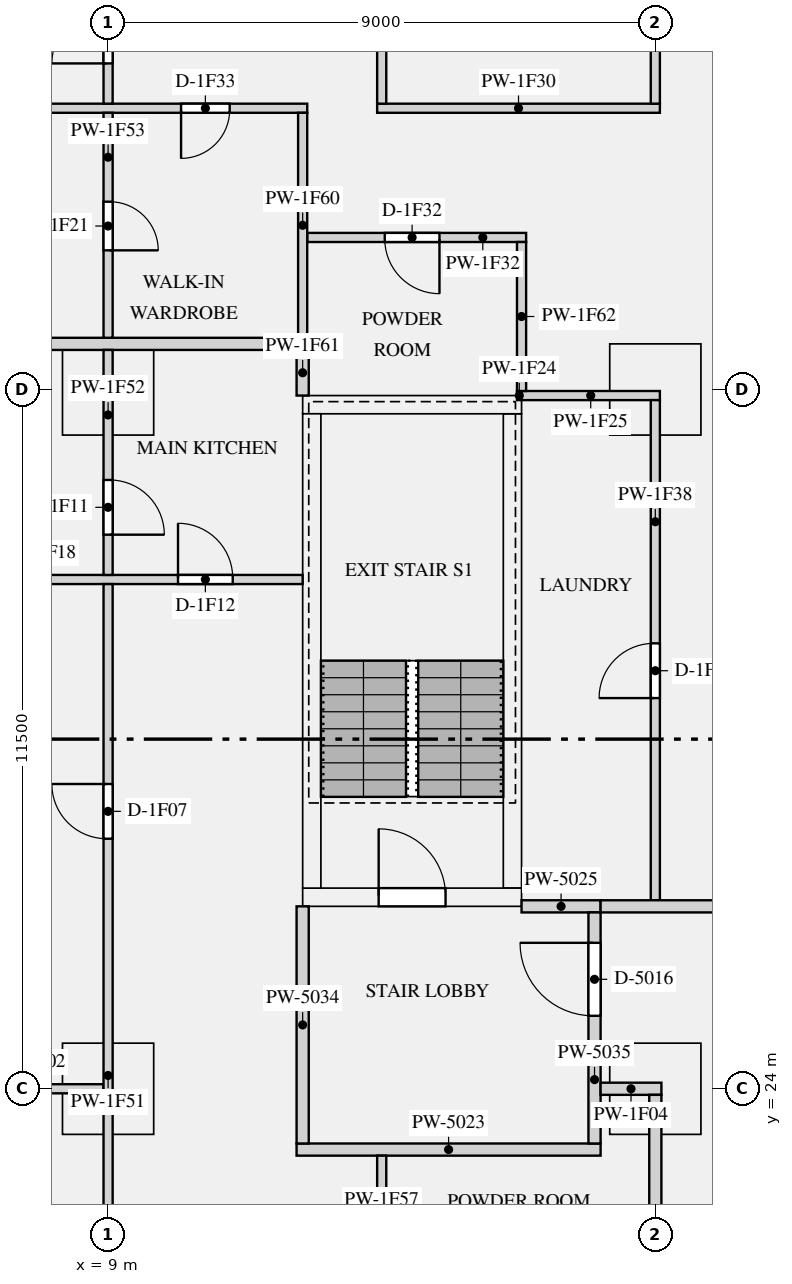
"""IFC4 building model, lengths in metres.
Left out: names, types, materials, properties, quantities, classifications, styles, units other than length and angle.
Written with IfcOpenShell. Run it as: python <this file> out.ifc"""

import sys

from ifc_helpers import new_model, si_unit, direction, frame, frame_2d, origin, origin_2d, place, context, subcontext, project, spatial, rectangle, extrude, element, fill, save


model = new_model("IFC4")
c1 = context("Model", 3, precision=1e-05, world=origin(), true_north=direction((0.0, 1.0)))
c2 = subcontext(c1, "Body", "Model", "MODEL_VIEW")
j1 = project(units=[si_unit("LENGTHUNIT", "METRE"), si_unit("PLANEANGLEUNIT", "RADIAN")], contexts=[c1])
p1 = place(None, origin())
s1 = spatial("IfcSite", under=j1, at=p1, CompositionType="ELEMENT")
p2 = place(p1, origin())
s2 = spatial("IfcBuilding", under=s1, at=p2, CompositionType="ELEMENT")
p3 = place(p2, frame((0.0, 0.0, 60.45)))
s3 = spatial("IfcBuildingStorey", under=s2, at=p3, CompositionType="ELEMENT", Elevation=60.45)
for number, where, z_axis, x_axis in (
    (1, (9.0, 24.0, 0.0), (0.0, 0.0, 1.0), (1.0, 0.0, 0.0)),
    (2, (18.0, 24.0, 0.0), (0.0, 0.0, 1.0), (1.0, 0.0, 0.0)),
    (3, (9.0, 35.5, 0.0), (0.0, 0.0, 1.0), (1.0, 0.0, 0.0)),
    (4, (18.0, 35.5, 0.0), (0.0, 0.0, 1.0), (1.0, 0.0, 0.0)),
):
    element("IfcColumn", number, at=place(p3, frame(where, z_axis=z_axis, x_axis=x_axis)), inside=s3, PredefinedType="COLUMN", context=c2, shape_type="SweptSolid", body=[
        extrude(rectangle(XDim=1.5, YDim=1.5, at=origin_2d()), origin(), (0.0, 0.0, 1.0), 3.15),
    ])
p4 = place(p3, frame((12.2, 27.15, 0.0), z_axis=(0.0, 0.0, 1.0), x_axis=(1.0, 0.0, 0.0)))
e5 = element("IfcWall", 5, at=p4, inside=s3, PredefinedType="SHEAR", context=c2, shape_type="SweptSolid", body=[
    extrude(rectangle(XDim=3.6, YDim=0.3, at=frame_2d((1.8, 0.0))), origin(), (0.0, 0.0, 1.0), 3.15),
])
p5 = place(p4, frame((1.25, 0.0, 0.0)))
e6 = element("IfcOpeningElement", 6, at=p5, cuts=e5, PredefinedType="OPENING", context=c2, shape_type="SweptSolid", body=[
    extrude(rectangle(XDim=1.1, YDim=2.1, at=frame_2d((0.55, 1.05))), frame((0.0, 0.16, 0.0), z_axis=(0.0, -1.0, 0.0), x_axis=(1.0, 0.0, 0.0)), (0.0, 0.0, 1.0), 0.32),
])
p6 = place(p3, frame((12.2, 35.25, 0.0), z_axis=(0.0, 0.0, 1.0), x_axis=(1.0, 0.0, 0.0)))
e7 = element("IfcWall", 7, at=p6, inside=s3, PredefinedType="SHEAR", context=c2, shape_type="SweptSolid", body=[
    extrude(rectangle(XDim=3.6, YDim=0.3, at=frame_2d((1.8, 0.0))), origin(), (0.0, 0.0, 1.0), 3.15),
])
for number, where, z_axis, x_axis in (
    (8, (12.35, 27.3, 0.0), (0.0, 0.0, 1.0), (0.0, 1.0, 0.0)),
    (9, (15.65, 27.3, 0.0), (0.0, 0.0, 1.0), (0.0, 1.0, 0.0)),
):
    element("IfcWall", number, at=place(p3, frame(where, z_axis=z_axis, x_axis=x_axis)), inside=s3, PredefinedType="SHEAR", context=c2, shape_type="SweptSolid", body=[
        extrude(rectangle(XDim=7.8, YDim=0.3, at=frame_2d((3.9, 0.0))), origin(), (0.0, 0.0, 1.0), 3.15),
    ])
p7 = place(p3, frame((12.1, 23.0, 0.0), z_axis=(0.0, 0.0, 1.0), x_axis=(1.0, 0.0, 0.0)))
e10 = element("IfcWall", 10, at=p7, inside=s3, PredefinedType="PARTITIONING", context=c2, shape_type="SweptSolid", body=[
    extrude(rectangle(XDim=5.0, YDim=0.2, at=frame_2d((2.5, 0.0))), origin(), (0.0, 0.0, 1.0), 2.83),
])
p8 = place(p3, frame((15.8, 27.0, 0.0), z_axis=(0.0, 0.0, 1.0), x_axis=(1.0, 0.0, 0.0)))
e11 = element("IfcWall", 11, at=p8, inside=s3, PredefinedType="PARTITIONING", context=c2, shape_type="SweptSolid", body=[
    extrude(rectangle(XDim=1.3, YDim=0.2, at=frame_2d((0.65, 0.0))), origin(), (0.0, 0.0, 1.0), 2.83),
])
p9 = place(p3, frame((12.2, 23.1, 0.0), z_axis=(0.0, 0.0, 1.0), x_axis=(0.0, 1.0, 0.0)))
e12 = element("IfcWall", 12, at=p9, inside=s3, PredefinedType="PARTITIONING", context=c2, shape_type="SweptSolid", body=[
    extrude(rectangle(XDim=3.9, YDim=0.2, at=frame_2d((1.95, 0.0))), origin(), (0.0, 0.0, 1.0), 2.83),
])
p10 = place(p3, frame((17.0, 23.1, 0.0), z_axis=(0.0, 0.0, 1.0), x_axis=(0.0, 1.0, 0.0)))
e13 = element("IfcWall", 13, at=p10, inside=s3, PredefinedType="PARTITIONING", context=c2, shape_type="SweptSolid", body=[
    extrude(rectangle(XDim=3.8, YDim=0.2, at=frame_2d((1.9, 0.0))), origin(), (0.0, 0.0, 1.0), 2.83),
])
p11 = place(p10, frame((2.1, 0.0, 0.0)))
e14 = element("IfcOpeningElement", 14, at=p11, cuts=e13, PredefinedType="OPENING", context=c2, shape_type="SweptSolid", body=[
    extrude(rectangle(XDim=1.2, YDim=2.1, at=frame_2d((0.6, 1.05))), frame((0.0, 0.11, 0.0), z_axis=(0.0, -1.0, 0.0), x_axis=(1.0, 0.0, 0.0)), (0.0, 0.0, 1.0), 0.22),
])
p12 = place(p3, frame((3.3, 24.0, 0.0), z_axis=(0.0, 0.0, 1.0), x_axis=(1.0, 0.0, 0.0)))
e15 = element("IfcWall", 15, at=p12, inside=s3, PredefinedType="PARTITIONING", context=c2, shape_type="SweptSolid", body=[
    extrude(rectangle(XDim=5.625, YDim=0.15, at=frame_2d((2.812, 0.0))), origin(), (0.0, 0.0, 1.0), 2.83),
])
p13 = place(p12, frame((1.65, 0.0, 0.0)))
e16 = element("IfcOpeningElement", 16, at=p13, cuts=e15, PredefinedType="OPENING", context=c2, shape_type="SweptSolid", body=[
    extrude(rectangle(XDim=1.5, YDim=2.1, at=frame_2d((0.75, 1.05))), frame((0.0, 0.085, 0.0), z_axis=(0.0, -1.0, 0.0), x_axis=(1.0, 0.0, 0.0)), (0.0, 0.0, 1.0), 0.17),
])
p14 = place(p3, frame((17.1, 24.0, 0.0), z_axis=(0.0, 0.0, 1.0), x_axis=(1.0, 0.0, 0.0)))
e17 = element("IfcWall", 17, at=p14, inside=s3, PredefinedType="PARTITIONING", context=c2, shape_type="SweptSolid", body=[
    extrude(rectangle(XDim=1.0, YDim=0.2, at=frame_2d((0.5, 0.0))), origin(), (0.0, 0.0, 1.0), 2.83),
])
p15 = place(p3, frame((17.1, 27.0, 0.0), z_axis=(0.0, 0.0, 1.0), x_axis=(1.0, 0.0, 0.0)))
e18 = element("IfcWall", 18, at=p15, inside=s3, PredefinedType="PARTITIONING", context=c2, shape_type="SweptSolid", body=[
    extrude(rectangle(XDim=7.0, YDim=0.2, at=frame_2d((3.5, 0.0))), origin(), (0.0, 0.0, 1.0), 2.83),
])
p16 = place(p3, frame((0.8, 32.375, 0.0), z_axis=(0.0, 0.0, 1.0), x_axis=(1.0, 0.0, 0.0)))
e19 = element("IfcWall", 19, at=p16, inside=s3, PredefinedType="PARTITIONING", context=c2, shape_type="SweptSolid", body=[
    extrude(rectangle(XDim=11.4, YDim=0.15, at=frame_2d((5.7, 0.0))), origin(), (0.0, 0.0, 1.0), 2.83),
])
p17 = place(p16, frame((3.275, 0.0, 0.0)))
e20 = element("IfcOpeningElement", 20, at=p17, cuts=e19, PredefinedType="OPENING", context=c2, shape_type="SweptSolid", body=[
    extrude(rectangle(XDim=1.5, YDim=2.1, at=frame_2d((0.75, 1.05))), frame((0.0, 0.085, 0.0), z_axis=(0.0, -1.0, 0.0), x_axis=(1.0, 0.0, 0.0)), (0.0, 0.0, 1.0), 0.17),
])
p18 = place(p16, frame((9.35, 0.0, 0.0)))
e21 = element("IfcOpeningElement", 21, at=p18, cuts=e19, PredefinedType="OPENING", context=c2, shape_type="SweptSolid", body=[
    extrude(rectangle(XDim=0.9, YDim=2.1, at=frame_2d((0.45, 1.05))), frame((0.0, 0.085, 0.0), z_axis=(0.0, -1.0, 0.0), x_axis=(1.0, 0.0, 0.0)), (0.0, 0.0, 1.0), 0.17),
])
p19 = place(p3, frame((0.8, 36.25, 0.0), z_axis=(0.0, 0.0, 1.0), x_axis=(1.0, 0.0, 0.0)))
e22 = element("IfcWall", 22, at=p19, inside=s3, PredefinedType="PARTITIONING", context=c2, shape_type="SweptSolid", body=[
    extrude(rectangle(XDim=11.475, YDim=0.2, at=frame_2d((5.737, 0.0))), origin(), (0.0, 0.0, 1.0), 2.83),
])
p20 = place(p3, frame((15.725, 35.4, 0.0), z_axis=(0.0, 0.0, 1.0), x_axis=(1.0, 0.0, 0.0)))
e23 = element("IfcWall", 23, at=p20, inside=s3, PredefinedType="PARTITIONING", context=c2, shape_type="SweptSolid", body=[
    extrude(rectangle(XDim=0.075, YDim=0.15, at=frame_2d((0.038, 0.0))), origin(), (0.0, 0.0, 1.0), 2.83),
])
p21 = place(p3, frame((15.8, 35.4, 0.0), z_axis=(0.0, 0.0, 1.0), x_axis=(1.0, 0.0, 0.0)))
e24 = element("IfcWall", 24, at=p21, inside=s3, PredefinedType="PARTITIONING", context=c2, shape_type="SweptSolid", body=[
    extrude(rectangle(XDim=2.275, YDim=0.15, at=frame_2d((1.137, 0.0))), origin(), (0.0, 0.0, 1.0), 2.83),
])
p22 = place(p3, frame((0.8, 40.125, 0.0), z_axis=(0.0, 0.0, 1.0), x_axis=(1.0, 0.0, 0.0)))
e25 = element("IfcWall", 25, at=p22, inside=s3, PredefinedType="PARTITIONING", context=c2, shape_type="SweptSolid", body=[
    extrude(rectangle(XDim=11.475, YDim=0.15, at=frame_2d((5.737, 0.0))), origin(), (0.0, 0.0, 1.0), 2.83),
])
p23 = place(p22, frame((9.4, 0.0, 0.0)))
e26 = element("IfcOpeningElement", 26, at=p23, cuts=e25, PredefinedType="OPENING", context=c2, shape_type="SweptSolid", body=[
    extrude(rectangle(XDim=0.8, YDim=2.1, at=frame_2d((0.4, 1.05))), frame((0.0, 0.085, 0.0), z_axis=(0.0, -1.0, 0.0), x_axis=(1.0, 0.0, 0.0)), (0.0, 0.0, 1.0), 0.17),
])
p24 = place(p3, frame((13.425, 40.125, 0.0), z_axis=(0.0, 0.0, 1.0), x_axis=(1.0, 0.0, 0.0)))
e27 = element("IfcWall", 27, at=p24, inside=s3, PredefinedType="PARTITIONING", context=c2, shape_type="SweptSolid", body=[
    extrude(rectangle(XDim=4.65, YDim=0.15, at=frame_2d((2.325, 0.0))), origin(), (0.0, 0.0, 1.0), 2.83),
])
p25 = place(p3, frame((12.275, 38.0, 0.0), z_axis=(0.0, 0.0, 1.0), x_axis=(1.0, 0.0, 0.0)))
e28 = element("IfcWall", 28, at=p25, inside=s3, PredefinedType="PARTITIONING", context=c2, shape_type="SweptSolid", body=[
    extrude(rectangle(XDim=3.6, YDim=0.15, at=frame_2d((1.8, 0.0))), origin(), (0.0, 0.0, 1.0), 2.83),
])
p26 = place(p25, frame((1.275, 0.0, 0.0)))
e29 = element("IfcOpeningElement", 29, at=p26, cuts=e28, PredefinedType="OPENING", context=c2, shape_type="SweptSolid", body=[
    extrude(rectangle(XDim=0.9, YDim=2.1, at=frame_2d((0.45, 1.05))), frame((0.0, 0.085, 0.0), z_axis=(0.0, -1.0, 0.0), x_axis=(1.0, 0.0, 0.0)), (0.0, 0.0, 1.0), 0.17),
])
p27 = place(p3, frame((18.0, 27.1, 0.0), z_axis=(0.0, 0.0, 1.0), x_axis=(0.0, 1.0, 0.0)))
e30 = element("IfcWall", 30, at=p27, inside=s3, PredefinedType="PARTITIONING", context=c2, shape_type="SweptSolid", body=[
    extrude(rectangle(XDim=8.225, YDim=0.15, at=frame_2d((4.112, 0.0))), origin(), (0.0, 0.0, 1.0), 2.83),
])
p28 = place(p27, frame((3.325, 0.0, 0.0)))
e31 = element("IfcOpeningElement", 31, at=p28, cuts=e30, PredefinedType="OPENING", context=c2, shape_type="SweptSolid", body=[
    extrude(rectangle(XDim=0.9, YDim=2.1, at=frame_2d((0.45, 1.05))), frame((0.0, 0.085, 0.0), z_axis=(0.0, -1.0, 0.0), x_axis=(1.0, 0.0, 0.0)), (0.0, 0.0, 1.0), 0.17),
])
p29 = place(p3, frame((18.0, 40.2, 0.0), z_axis=(0.0, 0.0, 1.0), x_axis=(0.0, 1.0, 0.0)))
e32 = element("IfcWall", 32, at=p29, inside=s3, PredefinedType="PARTITIONING", context=c2, shape_type="SweptSolid", body=[
    extrude(rectangle(XDim=7.5, YDim=0.15, at=frame_2d((3.75, 0.0))), origin(), (0.0, 0.0, 1.0), 2.83),
])
p30 = place(p29, frame((0.912, 0.0, 0.0)))
e33 = element("IfcOpeningElement", 33, at=p30, cuts=e32, PredefinedType="OPENING", context=c2, shape_type="SweptSolid", body=[
    extrude(rectangle(XDim=0.9, YDim=2.1, at=frame_2d((0.45, 1.05))), frame((0.0, 0.085, 0.0), z_axis=(0.0, -1.0, 0.0), x_axis=(1.0, 0.0, 0.0)), (0.0, 0.0, 1.0), 0.17),
])
p31 = place(p3, frame((18.0, 16.1, 0.0), z_axis=(0.0, 0.0, 1.0), x_axis=(0.0, 1.0, 0.0)))
e34 = element("IfcWall", 34, at=p31, inside=s3, PredefinedType="PARTITIONING", context=c2, shape_type="SweptSolid", body=[
    extrude(rectangle(XDim=7.8, YDim=0.2, at=frame_2d((3.9, 0.0))), origin(), (0.0, 0.0, 1.0), 2.83),
])
p32 = place(p31, frame((1.35, 0.0, 0.0)))
e35 = element("IfcOpeningElement", 35, at=p32, cuts=e34, PredefinedType="OPENING", context=c2, shape_type="SweptSolid", body=[
    extrude(rectangle(XDim=1.1, YDim=2.1, at=frame_2d((0.55, 1.05))), frame((0.0, 0.11, 0.0), z_axis=(0.0, -1.0, 0.0), x_axis=(1.0, 0.0, 0.0)), (0.0, 0.0, 1.0), 0.22),
])
p33 = place(p3, frame((9.0, 12.575, 0.0), z_axis=(0.0, 0.0, 1.0), x_axis=(0.0, 1.0, 0.0)))
e36 = element("IfcWall", 36, at=p33, inside=s3, PredefinedType="PARTITIONING", context=c2, shape_type="SweptSolid", body=[
    extrude(rectangle(XDim=19.725, YDim=0.15, at=frame_2d((9.863, 0.0))), origin(), (0.0, 0.0, 1.0), 2.83),
])
p34 = place(p33, frame((15.537, 0.0, 0.0)))
e37 = element("IfcOpeningElement", 37, at=p34, cuts=e36, PredefinedType="OPENING", context=c2, shape_type="SweptSolid", body=[
    extrude(rectangle(XDim=0.9, YDim=2.1, at=frame_2d((0.45, 1.05))), frame((0.0, 0.085, 0.0), z_axis=(0.0, -1.0, 0.0), x_axis=(1.0, 0.0, 0.0)), (0.0, 0.0, 1.0), 0.17),
])
p35 = place(p33, frame((6.85, 0.0, 0.0)))
e38 = element("IfcOpeningElement", 38, at=p35, cuts=e36, PredefinedType="OPENING", context=c2, shape_type="SweptSolid", body=[
    extrude(rectangle(XDim=0.9, YDim=2.1, at=frame_2d((0.45, 1.05))), frame((0.0, 0.085, 0.0), z_axis=(0.0, -1.0, 0.0), x_axis=(1.0, 0.0, 0.0)), (0.0, 0.0, 1.0), 0.17),
])
p36 = place(p3, frame((9.0, 32.45, 0.0), z_axis=(0.0, 0.0, 1.0), x_axis=(0.0, 1.0, 0.0)))
e39 = element("IfcWall", 39, at=p36, inside=s3, PredefinedType="PARTITIONING", context=c2, shape_type="SweptSolid", body=[
    extrude(rectangle(XDim=3.7, YDim=0.15, at=frame_2d((1.85, 0.0))), origin(), (0.0, 0.0, 1.0), 2.83),
])
p37 = place(p36, frame((0.662, 0.0, 0.0)))
e40 = element("IfcOpeningElement", 40, at=p37, cuts=e39, PredefinedType="OPENING", context=c2, shape_type="SweptSolid", body=[
    extrude(rectangle(XDim=0.9, YDim=2.1, at=frame_2d((0.45, 1.05))), frame((0.0, 0.085, 0.0), z_axis=(0.0, -1.0, 0.0), x_axis=(1.0, 0.0, 0.0)), (0.0, 0.0, 1.0), 0.17),
])
p38 = place(p3, frame((9.0, 36.35, 0.0), z_axis=(0.0, 0.0, 1.0), x_axis=(0.0, 1.0, 0.0)))
e41 = element("IfcWall", 41, at=p38, inside=s3, PredefinedType="PARTITIONING", context=c2, shape_type="SweptSolid", body=[
    extrude(rectangle(XDim=3.7, YDim=0.15, at=frame_2d((1.85, 0.0))), origin(), (0.0, 0.0, 1.0), 2.83),
])
p39 = place(p38, frame((1.438, 0.0, 0.0)))
e42 = element("IfcOpeningElement", 42, at=p39, cuts=e41, PredefinedType="OPENING", context=c2, shape_type="SweptSolid", body=[
    extrude(rectangle(XDim=0.8, YDim=2.1, at=frame_2d((0.4, 1.05))), frame((0.0, 0.085, 0.0), z_axis=(0.0, -1.0, 0.0), x_axis=(1.0, 0.0, 0.0)), (0.0, 0.0, 1.0), 0.17),
])
p40 = place(p3, frame((9.0, 40.2, 0.0), z_axis=(0.0, 0.0, 1.0), x_axis=(0.0, 1.0, 0.0)))
e43 = element("IfcWall", 43, at=p40, inside=s3, PredefinedType="PARTITIONING", context=c2, shape_type="SweptSolid", body=[
    extrude(rectangle(XDim=7.5, YDim=0.15, at=frame_2d((3.75, 0.0))), origin(), (0.0, 0.0, 1.0), 2.83),
])
p41 = place(p40, frame((6.075, 0.0, 0.0)))
e44 = element("IfcOpeningElement", 44, at=p41, cuts=e43, PredefinedType="OPENING", context=c2, shape_type="SweptSolid", body=[
    extrude(rectangle(XDim=0.8, YDim=2.1, at=frame_2d((0.4, 1.05))), frame((0.0, 0.085, 0.0), z_axis=(0.0, -1.0, 0.0), x_axis=(1.0, 0.0, 0.0)), (0.0, 0.0, 1.0), 0.17),
])
p42 = place(p40, frame((3.4, 0.0, 0.0)))
e45 = element("IfcOpeningElement", 45, at=p42, cuts=e43, PredefinedType="OPENING", context=c2, shape_type="SweptSolid", body=[
    extrude(rectangle(XDim=0.8, YDim=2.1, at=frame_2d((0.4, 1.05))), frame((0.0, 0.085, 0.0), z_axis=(0.0, -1.0, 0.0), x_axis=(1.0, 0.0, 0.0)), (0.0, 0.0, 1.0), 0.17),
])
p43 = place(p40, frame((0.662, 0.0, 0.0)))
e46 = element("IfcOpeningElement", 46, at=p43, cuts=e43, PredefinedType="OPENING", context=c2, shape_type="SweptSolid", body=[
    extrude(rectangle(XDim=0.9, YDim=2.1, at=frame_2d((0.45, 1.05))), frame((0.0, 0.085, 0.0), z_axis=(0.0, -1.0, 0.0), x_axis=(1.0, 0.0, 0.0)), (0.0, 0.0, 1.0), 0.17),
])
p44 = place(p3, frame((13.5, 20.575, 0.0), z_axis=(0.0, 0.0, 1.0), x_axis=(0.0, 1.0, 0.0)))
e47 = element("IfcWall", 47, at=p44, inside=s3, PredefinedType="PARTITIONING", context=c2, shape_type="SweptSolid", body=[
    extrude(rectangle(XDim=2.325, YDim=0.15, at=frame_2d((1.163, 0.0))), origin(), (0.0, 0.0, 1.0), 2.83),
])
p45 = place(p3, frame((13.5, 40.2, 0.0), z_axis=(0.0, 0.0, 1.0), x_axis=(0.0, 1.0, 0.0)))
e48 = element("IfcWall", 48, at=p45, inside=s3, PredefinedType="PARTITIONING", context=c2, shape_type="SweptSolid", body=[
    extrude(rectangle(XDim=7.5, YDim=0.15, at=frame_2d((3.75, 0.0))), origin(), (0.0, 0.0, 1.0), 2.83),
])
p46 = place(p45, frame((6.075, 0.0, 0.0)))
e49 = element("IfcOpeningElement", 49, at=p46, cuts=e48, PredefinedType="OPENING", context=c2, shape_type="SweptSolid", body=[
    extrude(rectangle(XDim=0.8, YDim=2.1, at=frame_2d((0.4, 1.05))), frame((0.0, 0.085, 0.0), z_axis=(0.0, -1.0, 0.0), x_axis=(1.0, 0.0, 0.0)), (0.0, 0.0, 1.0), 0.17),
])
p47 = place(p45, frame((3.4, 0.0, 0.0)))
e50 = element("IfcOpeningElement", 50, at=p47, cuts=e48, PredefinedType="OPENING", context=c2, shape_type="SweptSolid", body=[
    extrude(rectangle(XDim=0.8, YDim=2.1, at=frame_2d((0.4, 1.05))), frame((0.0, 0.085, 0.0), z_axis=(0.0, -1.0, 0.0), x_axis=(1.0, 0.0, 0.0)), (0.0, 0.0, 1.0), 0.17),
])
p48 = place(p3, frame((12.2, 36.35, 0.0), z_axis=(0.0, 0.0, 1.0), x_axis=(0.0, 1.0, 0.0)))
e51 = element("IfcWall", 51, at=p48, inside=s3, PredefinedType="PARTITIONING", context=c2, shape_type="SweptSolid", body=[
    extrude(rectangle(XDim=3.7, YDim=0.15, at=frame_2d((1.85, 0.0))), origin(), (0.0, 0.0, 1.0), 2.83),
])
p49 = place(p3, frame((12.2, 35.4, 0.0), z_axis=(0.0, 0.0, 1.0), x_axis=(0.0, 1.0, 0.0)))
e52 = element("IfcWall", 52, at=p49, inside=s3, PredefinedType="PARTITIONING", context=c2, shape_type="SweptSolid", body=[
    extrude(rectangle(XDim=0.75, YDim=0.2, at=frame_2d((0.375, 0.0))), origin(), (0.0, 0.0, 1.0), 2.83),
])
p50 = place(p3, frame((15.8, 35.475, 0.0), z_axis=(0.0, 0.0, 1.0), x_axis=(0.0, 1.0, 0.0)))
e53 = element("IfcWall", 53, at=p50, inside=s3, PredefinedType="PARTITIONING", context=c2, shape_type="SweptSolid", body=[
    extrude(rectangle(XDim=2.45, YDim=0.15, at=frame_2d((1.225, 0.0))), origin(), (0.0, 0.0, 1.0), 2.83),
])
p51 = place(p5, origin())
e54 = element("IfcDoor", 54, at=p51, inside=s3, OperationType="SINGLE_SWING_LEFT", PredefinedType="DOOR", context=c2, shape_type="SweptSolid", body=[
    extrude(rectangle(XDim=1.1, YDim=2.1, at=frame_2d((0.55, 1.05))), frame((0.0, 0.025, 0.0), z_axis=(0.0, -1.0, 0.0), x_axis=(1.0, 0.0, 0.0)), (0.0, 0.0, 1.0), 0.05),
])
fill(e6, e54)
p52 = place(p11, origin())
e55 = element("IfcDoor", 55, at=p52, inside=s3, OperationType="SINGLE_SWING_RIGHT", PredefinedType="DOOR", context=c2, shape_type="SweptSolid", body=[
    extrude(rectangle(XDim=1.2, YDim=2.1, at=frame_2d((0.6, 1.05))), frame((0.0, 0.025, 0.0), z_axis=(0.0, -1.0, 0.0), x_axis=(1.0, 0.0, 0.0)), (0.0, 0.0, 1.0), 0.05),
])
fill(e14, e55)
p53 = place(p34, origin())
e56 = element("IfcDoor", 56, at=p53, inside=s3, OperationType="SINGLE_SWING_RIGHT", PredefinedType="DOOR", context=c2, shape_type="SweptSolid", body=[
    extrude(rectangle(XDim=0.9, YDim=2.1, at=frame_2d((0.45, 1.05))), frame((0.0, 0.025, 0.0), z_axis=(0.0, -1.0, 0.0), x_axis=(1.0, 0.0, 0.0)), (0.0, 0.0, 1.0), 0.05),
])
fill(e37, e56)
p54 = place(p37, frame((0.9, 0.0, 0.0), z_axis=(0.0, 0.0, 1.0), x_axis=(-1.0, 0.0, 0.0)))
e57 = element("IfcDoor", 57, at=p54, inside=s3, OperationType="SINGLE_SWING_RIGHT", PredefinedType="DOOR", context=c2, shape_type="SweptSolid", body=[
    extrude(rectangle(XDim=0.9, YDim=2.1, at=frame_2d((0.45, 1.05))), frame((0.0, 0.025, 0.0), z_axis=(0.0, -1.0, 0.0), x_axis=(1.0, 0.0, 0.0)), (0.0, 0.0, 1.0), 0.05),
])
fill(e40, e57)
p55 = place(p18, origin())
e58 = element("IfcDoor", 58, at=p55, inside=s3, OperationType="SINGLE_SWING_LEFT", PredefinedType="DOOR", context=c2, shape_type="SweptSolid", body=[
    extrude(rectangle(XDim=0.9, YDim=2.1, at=frame_2d((0.45, 1.05))), frame((0.0, 0.025, 0.0), z_axis=(0.0, -1.0, 0.0), x_axis=(1.0, 0.0, 0.0)), (0.0, 0.0, 1.0), 0.05),
])
fill(e21, e58)
p56 = place(p39, frame((0.8, 0.0, 0.0), z_axis=(0.0, 0.0, 1.0), x_axis=(-1.0, 0.0, 0.0)))
e59 = element("IfcDoor", 59, at=p56, inside=s3, OperationType="SINGLE_SWING_RIGHT", PredefinedType="DOOR", context=c2, shape_type="SweptSolid", body=[
    extrude(rectangle(XDim=0.8, YDim=2.1, at=frame_2d((0.4, 1.05))), frame((0.0, 0.025, 0.0), z_axis=(0.0, -1.0, 0.0), x_axis=(1.0, 0.0, 0.0)), (0.0, 0.0, 1.0), 0.05),
])
fill(e42, e59)
p57 = place(p28, origin())
e60 = element("IfcDoor", 60, at=p57, inside=s3, OperationType="SINGLE_SWING_LEFT", PredefinedType="DOOR", context=c2, shape_type="SweptSolid", body=[
    extrude(rectangle(XDim=0.9, YDim=2.1, at=frame_2d((0.45, 1.05))), frame((0.0, 0.025, 0.0), z_axis=(0.0, -1.0, 0.0), x_axis=(1.0, 0.0, 0.0)), (0.0, 0.0, 1.0), 0.05),
])
fill(e31, e60)
p58 = place(p43, origin())
e61 = element("IfcDoor", 61, at=p58, inside=s3, OperationType="SINGLE_SWING_LEFT", PredefinedType="DOOR", context=c2, shape_type="SweptSolid", body=[
    extrude(rectangle(XDim=0.9, YDim=2.1, at=frame_2d((0.45, 1.05))), frame((0.0, 0.025, 0.0), z_axis=(0.0, -1.0, 0.0), x_axis=(1.0, 0.0, 0.0)), (0.0, 0.0, 1.0), 0.05),
])
fill(e46, e61)
p59 = place(p26, frame((0.9, 0.0, 0.0), z_axis=(0.0, 0.0, 1.0), x_axis=(-1.0, 0.0, 0.0)))
e62 = element("IfcDoor", 62, at=p59, inside=s3, OperationType="SINGLE_SWING_LEFT", PredefinedType="DOOR", context=c2, shape_type="SweptSolid", body=[
    extrude(rectangle(XDim=0.9, YDim=2.1, at=frame_2d((0.45, 1.05))), frame((0.0, 0.025, 0.0), z_axis=(0.0, -1.0, 0.0), x_axis=(1.0, 0.0, 0.0)), (0.0, 0.0, 1.0), 0.05),
])
fill(e29, e62)
p60 = place(p23, frame((0.8, 0.0, 0.0), z_axis=(0.0, 0.0, 1.0), x_axis=(-1.0, 0.0, 0.0)))
e63 = element("IfcDoor", 63, at=p60, inside=s3, OperationType="SINGLE_SWING_RIGHT", PredefinedType="DOOR", context=c2, shape_type="SweptSolid", body=[
    extrude(rectangle(XDim=0.8, YDim=2.1, at=frame_2d((0.4, 1.05))), frame((0.0, 0.025, 0.0), z_axis=(0.0, -1.0, 0.0), x_axis=(1.0, 0.0, 0.0)), (0.0, 0.0, 1.0), 0.05),
])
fill(e26, e63)
save(model, sys.argv[1])
